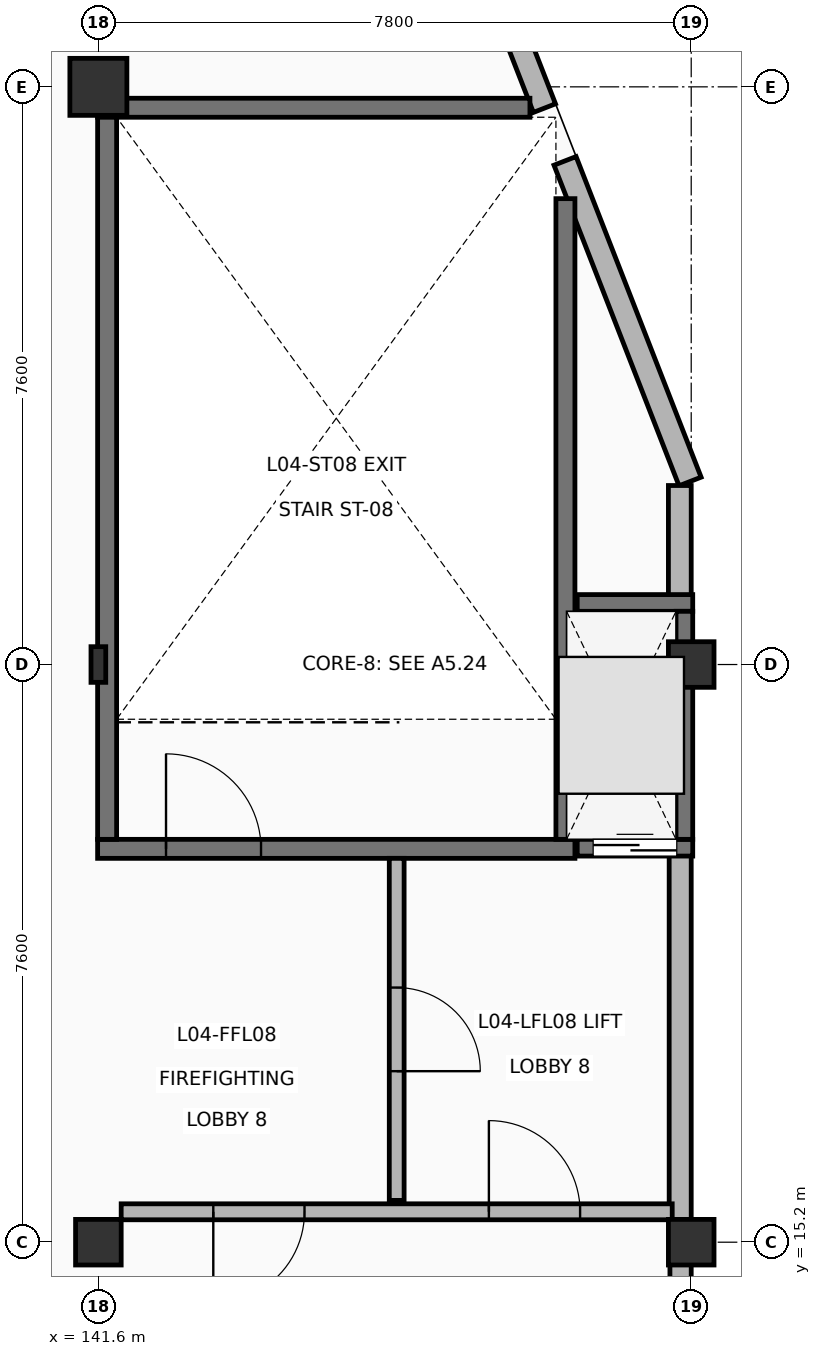
"""IFC4 building model, lengths in metres.
Left out: names, types, materials, properties, quantities, classifications, styles, units other than length and angle.
Written with IfcOpenShell. Run it as: python <this file> out.ifc"""

import sys

from ifc_helpers import new_model, si_unit, direction, frame, frame_2d, origin, origin_2d, place, context, subcontext, project, spatial, rectangle, circle, i_section, extrude, element, fill, save


model = new_model("IFC4")
c1 = context("Model", 3, precision=1e-05, world=origin(), true_north=direction((0.0, 1.0)))
c2 = subcontext(c1, "Body", "Model", "MODEL_VIEW")
j1 = project(units=[si_unit("LENGTHUNIT", "METRE"), si_unit("PLANEANGLEUNIT", "RADIAN")], contexts=[c1])
p1 = place(None, origin())
s1 = spatial("IfcSite", under=j1, at=p1, CompositionType="ELEMENT")
p2 = place(p1, origin())
s2 = spatial("IfcBuilding", under=s1, at=p2, CompositionType="ELEMENT")
p3 = place(p2, frame((0.0, 0.0, 15.3)))
s3 = spatial("IfcBuildingStorey", under=s2, at=p3, CompositionType="ELEMENT", Elevation=15.3)
p4 = place(p3, frame((141.6, 15.2, 0.0), z_axis=(0.0, 0.0, 1.0), x_axis=(1.0, 0.0, 0.0)))
e1 = element("IfcColumn", 1, at=p4, inside=s3, PredefinedType="COLUMN", context=c2, shape_type="SweptSolid", body=[
    extrude(rectangle(XDim=0.6, YDim=0.6, at=origin_2d()), origin(), (0.0, 0.0, 1.0), 4.285),
])
p5 = place(p3, frame((141.6, 22.8, 0.0), z_axis=(0.0, 0.0, 1.0), x_axis=(1.0, 0.0, 0.0)))
e2 = element("IfcColumn", 2, at=p5, inside=s3, PredefinedType="COLUMN", context=c2, shape_type="SweptSolid", body=[
    extrude(i_section(OverallWidth=0.194, OverallDepth=0.469, WebThickness=0.013, FlangeThickness=0.021, at=origin_2d()), origin(), (0.0, 0.0, 1.0), 4.285),
])
p6 = place(p3, frame((141.6, 30.4, 0.0), z_axis=(0.0, 0.0, 1.0), x_axis=(1.0, 0.0, 0.0)))
e3 = element("IfcColumn", 3, at=p6, inside=s3, PredefinedType="COLUMN", context=c2, shape_type="SweptSolid", body=[
    extrude(circle(Radius=0.375, at=origin_2d()), origin(), (0.0, 0.0, 1.0), 4.285),
])
for number, where, z_axis, x_axis in (
    (4, (149.4, 15.2, 0.0), (0.0, 0.0, 1.0), (1.0, 0.0, 0.0)),
    (5, (149.4, 22.8, 0.0), (0.0, 0.0, 1.0), (1.0, 0.0, 0.0)),
):
    element("IfcColumn", number, at=place(p3, frame(where, z_axis=z_axis, x_axis=x_axis)), inside=s3, PredefinedType="COLUMN", context=c2, shape_type="SweptSolid", body=[
        extrude(rectangle(XDim=0.6, YDim=0.6, at=origin_2d()), origin(), (0.0, 0.0, 1.0), 4.285),
    ])
p7 = place(p3, frame((146.662, 32.191, 0.0), z_axis=(0.0, 0.0, 1.0), x_axis=(0.363061118292, -0.931765326885, 0.0)))
e6 = element("IfcWall", 6, at=p7, inside=s3, PredefinedType="SOLIDWALL", context=c2, shape_type="SweptSolid", body=[
    extrude(rectangle(XDim=2.222, YDim=0.312, at=frame_2d((1.111, 0.0))), origin(), (0.0, 0.0, 1.0), 4.26),
])
p8 = place(p3, frame((147.74, 29.426, 0.0), z_axis=(0.0, 0.0, 1.0), x_axis=(0.363343872327, -0.93165510273, 0.0)))
e7 = element("IfcWall", 7, at=p8, inside=s3, PredefinedType="SOLIDWALL", context=c2, shape_type="SweptSolid", body=[
    extrude(rectangle(XDim=4.527, YDim=0.312, at=frame_2d((2.264, 0.0))), origin(), (0.0, 0.0, 1.0), 4.26),
])
p9 = place(p3, frame((149.25, 25.155, 0.0), z_axis=(0.0, 0.0, 1.0), x_axis=(0.0, -1.0, 0.0)))
e8 = element("IfcWall", 8, at=p9, inside=s3, PredefinedType="SOLIDWALL", context=c2, shape_type="SweptSolid", body=[
    extrude(rectangle(XDim=1.475, YDim=0.3, at=frame_2d((0.738, 0.0))), origin(), (0.0, 0.0, 1.0), 4.26),
])
p10 = place(p3, frame((149.255, 20.32, 0.0), z_axis=(0.0, 0.0, 1.0), x_axis=(0.0, -1.0, 0.0)))
e9 = element("IfcWall", 9, at=p10, inside=s3, PredefinedType="SOLIDWALL", context=c2, shape_type="SweptSolid", body=[
    extrude(rectangle(XDim=4.835, YDim=0.29, at=frame_2d((2.417, 0.0))), origin(), (0.0, 0.0, 1.0), 4.26),
])
p11 = place(p3, frame((149.26, 14.915, 0.0), z_axis=(0.0, 0.0, 1.0), x_axis=(0.0, -1.0, 0.0)))
e10 = element("IfcWall", 10, at=p11, inside=s3, PredefinedType="SOLIDWALL", context=c2, shape_type="SweptSolid", body=[
    extrude(rectangle(XDim=7.275, YDim=0.28, at=frame_2d((3.638, 0.0))), origin(), (0.0, 0.0, 1.0), 4.26),
])
p12 = place(p3, frame((141.59, 20.375, 0.0), z_axis=(0.0, 0.0, 1.0), x_axis=(1.0, 0.0, 0.0)))
e11 = element("IfcWall", 11, at=p12, inside=s3, PredefinedType="SHEAR", context=c2, shape_type="SweptSolid", body=[
    extrude(rectangle(XDim=6.28, YDim=0.25, at=frame_2d((3.14, 0.0))), origin(), (0.0, 0.0, 1.0), 4.28),
])
p13 = place(p12, frame((0.9, 0.0, 0.0)))
e12 = element("IfcOpeningElement", 12, at=p13, cuts=e11, PredefinedType="OPENING", context=c2, shape_type="SweptSolid", body=[
    extrude(rectangle(XDim=1.25, YDim=2.2, at=frame_2d((0.625, 1.1))), frame((0.0, 0.135, 0.0), z_axis=(0.0, -1.0, 0.0), x_axis=(1.0, 0.0, 0.0)), (0.0, 0.0, 1.0), 0.27),
])
p14 = place(p3, frame((141.59, 30.125, 0.0), z_axis=(0.0, 0.0, 1.0), x_axis=(1.0, 0.0, 0.0)))
e13 = element("IfcWall", 13, at=p14, inside=s3, PredefinedType="SHEAR", context=c2, shape_type="SweptSolid", body=[
    extrude(rectangle(XDim=5.688, YDim=0.25, at=frame_2d((2.844, 0.0))), origin(), (0.0, 0.0, 1.0), 4.28),
])
p15 = place(p3, frame((141.715, 20.5, 0.0), z_axis=(0.0, 0.0, 1.0), x_axis=(0.0, 1.0, 0.0)))
e14 = element("IfcWall", 14, at=p15, inside=s3, PredefinedType="SHEAR", context=c2, shape_type="SweptSolid", body=[
    extrude(rectangle(XDim=9.5, YDim=0.25, at=frame_2d((4.75, 0.0))), origin(), (0.0, 0.0, 1.0), 4.28),
])
p16 = place(p3, frame((147.745, 20.5, 0.0), z_axis=(0.0, 0.0, 1.0), x_axis=(0.0, 1.0, 0.0)))
e15 = element("IfcWall", 15, at=p16, inside=s3, PredefinedType="SHEAR", context=c2, shape_type="SweptSolid", body=[
    extrude(rectangle(XDim=8.429, YDim=0.25, at=frame_2d((4.214, 0.0))), origin(), (0.0, 0.0, 1.0), 4.28),
])
p17 = place(p3, frame((147.9, 20.39, 0.0), z_axis=(0.0, 0.0, 1.0), x_axis=(1.0, 0.0, 0.0)))
e16 = element("IfcWall", 16, at=p17, inside=s3, PredefinedType="SHEAR", context=c2, shape_type="SweptSolid", body=[
    extrude(rectangle(XDim=1.52, YDim=0.22, at=frame_2d((0.76, 0.0))), origin(), (0.0, 0.0, 1.0), 4.28),
])
p18 = place(p17, frame((0.21, 0.0, 0.0)))
e17 = element("IfcOpeningElement", 17, at=p18, cuts=e16, PredefinedType="OPENING", context=c2, shape_type="SweptSolid", body=[
    extrude(rectangle(XDim=1.1, YDim=2.15, at=frame_2d((0.55, 1.075))), frame((0.0, 0.12, 0.0), z_axis=(0.0, -1.0, 0.0), x_axis=(1.0, 0.0, 0.0)), (0.0, 0.0, 1.0), 0.24),
])
p19 = place(p3, frame((147.9, 23.61, 0.0), z_axis=(0.0, 0.0, 1.0), x_axis=(1.0, 0.0, 0.0)))
e18 = element("IfcWall", 18, at=p19, inside=s3, PredefinedType="SHEAR", context=c2, shape_type="SweptSolid", body=[
    extrude(rectangle(XDim=1.52, YDim=0.22, at=frame_2d((0.76, 0.0))), origin(), (0.0, 0.0, 1.0), 4.28),
])
p20 = place(p3, frame((149.31, 20.5, 0.0), z_axis=(0.0, 0.0, 1.0), x_axis=(0.0, 1.0, 0.0)))
e19 = element("IfcWall", 19, at=p20, inside=s3, PredefinedType="SHEAR", context=c2, shape_type="SweptSolid", body=[
    extrude(rectangle(XDim=3.0, YDim=0.22, at=frame_2d((1.5, 0.0))), origin(), (0.0, 0.0, 1.0), 4.28),
])
p21 = place(p3, frame((141.9, 15.6, 0.0), z_axis=(0.0, 0.0, 1.0), x_axis=(1.0, 0.0, 0.0)))
e20 = element("IfcWall", 20, at=p21, inside=s3, PredefinedType="PARTITIONING", context=c2, shape_type="SweptSolid", body=[
    extrude(rectangle(XDim=7.25, YDim=0.21, at=frame_2d((3.625, 0.0))), origin(), (0.0, 0.0, 1.0), 4.28),
])
p22 = place(p21, frame((1.212, 0.0, 0.0)))
e21 = element("IfcOpeningElement", 21, at=p22, cuts=e20, PredefinedType="OPENING", context=c2, shape_type="SweptSolid", body=[
    extrude(rectangle(XDim=1.2, YDim=2.2, at=frame_2d((0.6, 1.1))), frame((0.0, 0.115, 0.0), z_axis=(0.0, -1.0, 0.0), x_axis=(1.0, 0.0, 0.0)), (0.0, 0.0, 1.0), 0.23),
])
p23 = place(p21, frame((4.838, 0.0, 0.0)))
e22 = element("IfcOpeningElement", 22, at=p23, cuts=e20, PredefinedType="OPENING", context=c2, shape_type="SweptSolid", body=[
    extrude(rectangle(XDim=1.2, YDim=2.2, at=frame_2d((0.6, 1.1))), frame((0.0, 0.115, 0.0), z_axis=(0.0, -1.0, 0.0), x_axis=(1.0, 0.0, 0.0)), (0.0, 0.0, 1.0), 0.23),
])
p24 = place(p3, frame((145.525, 15.75, 0.0), z_axis=(0.0, 0.0, 1.0), x_axis=(0.0, 1.0, 0.0)))
e23 = element("IfcWall", 23, at=p24, inside=s3, PredefinedType="PARTITIONING", context=c2, shape_type="SweptSolid", body=[
    extrude(rectangle(XDim=4.5, YDim=0.195, at=frame_2d((2.25, 0.0))), origin(), (0.0, 0.0, 1.0), 4.28),
])
p25 = place(p24, frame((1.7, 0.0, 0.0)))
e24 = element("IfcOpeningElement", 24, at=p25, cuts=e23, PredefinedType="OPENING", context=c2, shape_type="SweptSolid", body=[
    extrude(rectangle(XDim=1.1, YDim=2.15, at=frame_2d((0.55, 1.075))), frame((0.0, 0.107, 0.0), z_axis=(0.0, -1.0, 0.0), x_axis=(1.0, 0.0, 0.0)), (0.0, 0.0, 1.0), 0.215),
])
p26 = place(p13, origin())
e25 = element("IfcDoor", 25, at=p26, inside=s3, OperationType="SINGLE_SWING_LEFT", PredefinedType="DOOR", context=c2, shape_type="SweptSolid", body=[
    extrude(rectangle(XDim=1.25, YDim=2.2, at=frame_2d((0.625, 1.1))), frame((0.0, 0.025, 0.0), z_axis=(0.0, -1.0, 0.0), x_axis=(1.0, 0.0, 0.0)), (0.0, 0.0, 1.0), 0.05),
])
fill(e12, e25)
p27 = place(p18, origin())
e26 = element("IfcDoor", 26, at=p27, inside=s3, OperationType="DOUBLE_DOOR_SLIDING", PredefinedType="DOOR", context=c2, shape_type="SweptSolid", body=[
    extrude(rectangle(XDim=1.1, YDim=2.15, at=frame_2d((0.55, 1.075))), frame((0.0, 0.025, 0.0), z_axis=(0.0, -1.0, 0.0), x_axis=(1.0, 0.0, 0.0)), (0.0, 0.0, 1.0), 0.05),
])
fill(e17, e26)
p28 = place(p22, origin())
e27 = element("IfcDoor", 27, at=p28, inside=s3, OperationType="SINGLE_SWING_RIGHT", PredefinedType="DOOR", context=c2, shape_type="SweptSolid", body=[
    extrude(rectangle(XDim=1.2, YDim=2.2, at=frame_2d((0.6, 1.1))), frame((0.0, 0.025, 0.0), z_axis=(0.0, -1.0, 0.0), x_axis=(1.0, 0.0, 0.0)), (0.0, 0.0, 1.0), 0.05),
])
fill(e21, e27)
p29 = place(p23, origin())
e28 = element("IfcDoor", 28, at=p29, inside=s3, OperationType="SINGLE_SWING_LEFT", PredefinedType="DOOR", context=c2, shape_type="SweptSolid", body=[
    extrude(rectangle(XDim=1.2, YDim=2.2, at=frame_2d((0.6, 1.1))), frame((0.0, 0.025, 0.0), z_axis=(0.0, -1.0, 0.0), x_axis=(1.0, 0.0, 0.0)), (0.0, 0.0, 1.0), 0.05),
])
fill(e22, e28)
p30 = place(p25, origin())
e29 = element("IfcDoor", 29, at=p30, inside=s3, OperationType="SINGLE_SWING_RIGHT", PredefinedType="DOOR", context=c2, shape_type="SweptSolid", body=[
    extrude(rectangle(XDim=1.1, YDim=2.15, at=frame_2d((0.55, 1.075))), frame((0.0, 0.025, 0.0), z_axis=(0.0, -1.0, 0.0), x_axis=(1.0, 0.0, 0.0)), (0.0, 0.0, 1.0), 0.05),
])
fill(e24, e29)
save(model, sys.argv[1])
